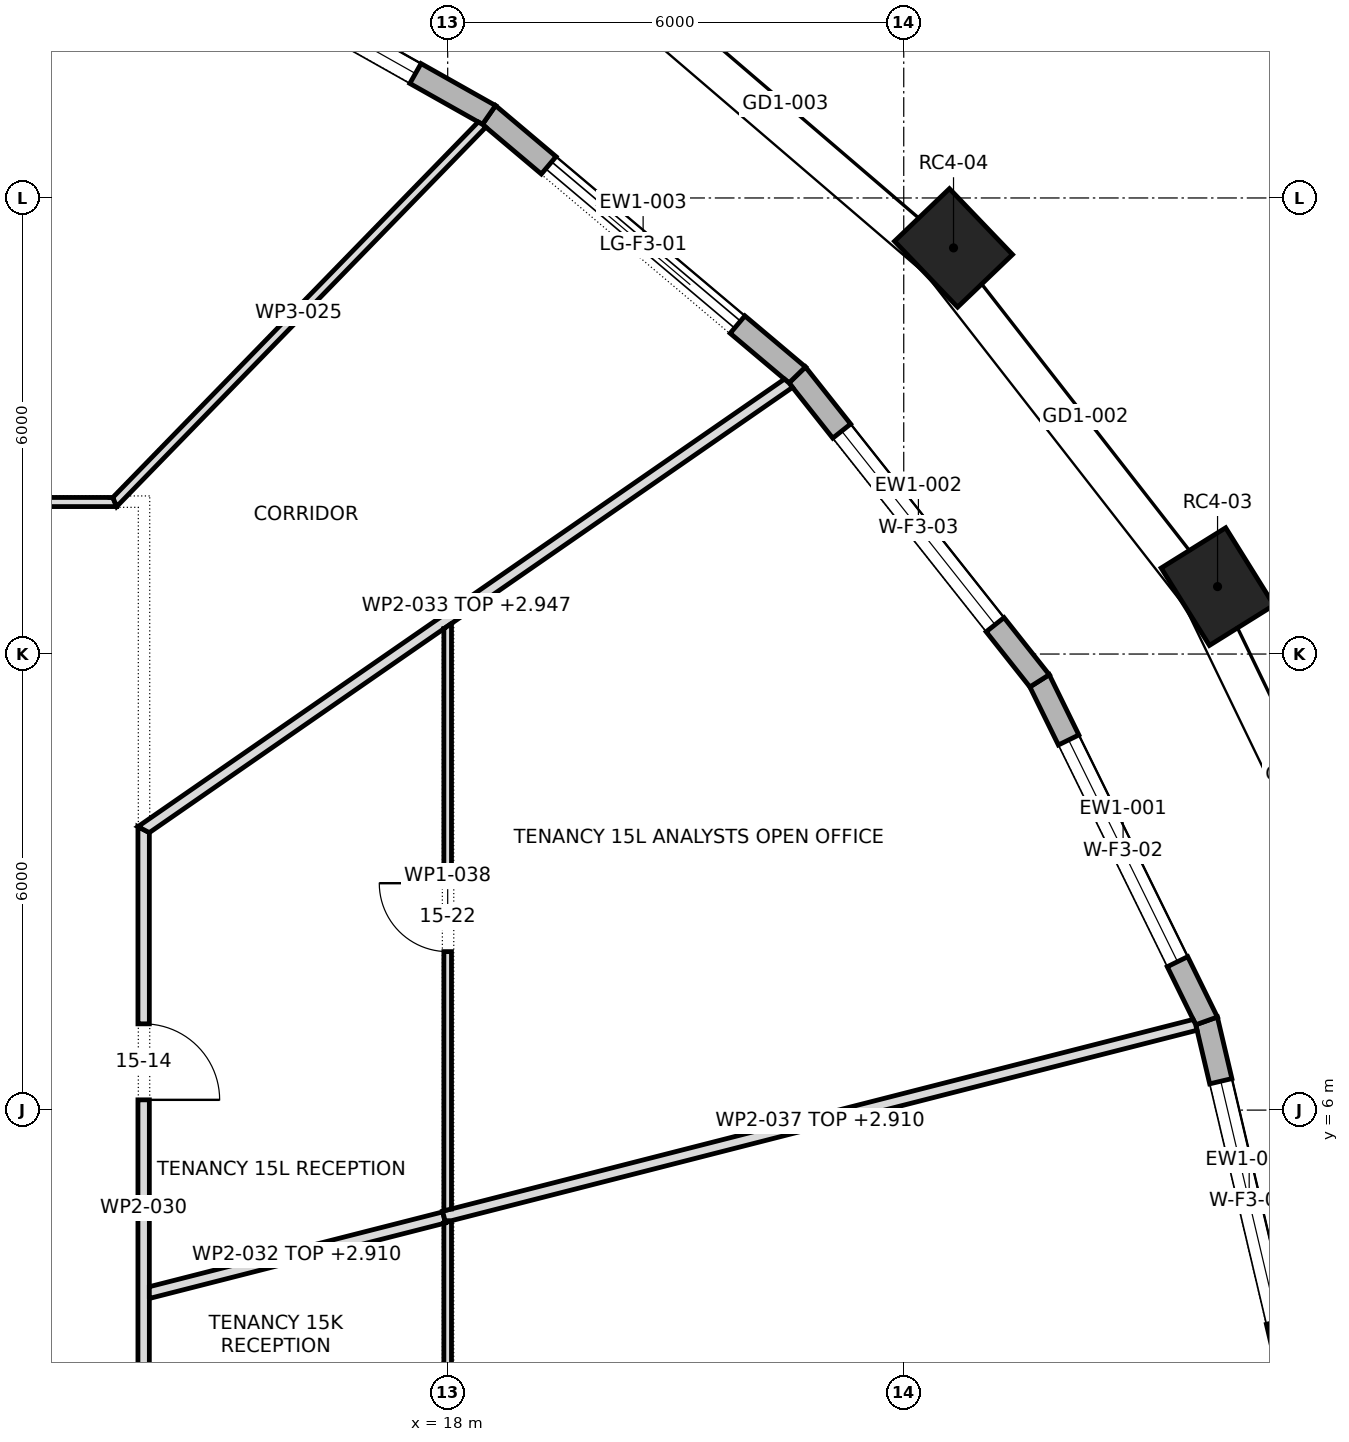
"""IFC4 building model, lengths in metres.
Left out: names, types, materials, properties, quantities, classifications, styles, units other than length and angle.
Written with IfcOpenShell. Run it as: python <this file> out.ifc"""

import sys

from ifc_helpers import new_model, si_unit, direction, frame, frame_2d, origin, origin_2d, place, context, subcontext, project, spatial, polyline, rectangle, outline, extrude, element, fill, save


model = new_model("IFC4")
c1 = context("Model", 3, precision=1e-05, world=origin(), true_north=direction((0.0, 1.0)))
c2 = subcontext(c1, "Body", "Model", "MODEL_VIEW")
j1 = project(units=[si_unit("LENGTHUNIT", "METRE"), si_unit("PLANEANGLEUNIT", "RADIAN")], contexts=[c1])
p1 = place(None, origin())
s1 = spatial("IfcSite", under=j1, at=p1, CompositionType="ELEMENT")
p2 = place(p1, origin())
s2 = spatial("IfcBuilding", under=s1, at=p2, CompositionType="ELEMENT")
p3 = place(p2, frame((0.0, 0.0, 214.9)))
s3 = spatial("IfcBuildingStorey", under=s2, at=p3, CompositionType="ELEMENT", Elevation=214.9)
for number, where, z_axis, x_axis in (
    (1, (28.129, 12.887, 0.0), (0.0, 0.0, 1.0), (-0.529, 0.849, 0.0)),
    (2, (24.655, 17.343, 0.0), (0.0, 0.0, 1.0), (-0.692, 0.722, 0.0)),
):
    element("IfcColumn", number, at=place(p3, frame(where, z_axis=z_axis, x_axis=x_axis)), inside=s3, PredefinedType="COLUMN", context=c2, shape_type="SweptSolid", body=[
        extrude(rectangle(XDim=1.2, YDim=1.0, at=origin_2d()), origin(), (0.0, 0.0, 1.0), 4.0),
    ])
p4 = place(p3, frame((29.104, 2.423, 0.0), z_axis=(0.0, 0.0, 1.0), x_axis=(-0.229546618766, 0.97329766763, 0.0)))
e3 = element("IfcWall", 3, at=p4, inside=s3, PredefinedType="STANDARD", context=c2, shape_type="SweptSolid", body=[
    extrude(outline(polyline([(-0.017, -0.15), (4.899, -0.15), (4.865, 0.15), (0.017, 0.15), (-0.017, -0.15)])), origin(), (0.0, 0.0, 1.0), 3.7),
])
p5 = place(p4, frame((0.816, 0.0, 0.6)))
e4 = element("IfcOpeningElement", 4, at=p5, cuts=e3, PredefinedType="OPENING", context=c2, shape_type="SweptSolid", body=[
    extrude(rectangle(XDim=3.25, YDim=2.65, at=frame_2d((1.625, 1.325))), frame((0.0, 0.162, 0.0), z_axis=(0.0, -1.0, 0.0), x_axis=(1.0, 0.0, 0.0)), (0.0, 0.0, 1.0), 0.324),
])
p6 = place(p3, frame((27.984, 7.174, 0.0), z_axis=(0.0, 0.0, 1.0), x_axis=(-0.440795186599, 0.897607711348, 0.0)))
e5 = element("IfcWall", 5, at=p6, inside=s3, PredefinedType="STANDARD", context=c2, shape_type="SweptSolid", body=[
    extrude(outline(polyline([(-0.017, -0.15), (5.0, -0.15), (4.968, 0.15), (0.017, 0.15), (-0.017, -0.15)])), origin(), (0.0, 0.0, 1.0), 3.7),
])
p7 = place(p6, frame((0.867, 0.0, 0.6)))
e6 = element("IfcOpeningElement", 6, at=p7, cuts=e5, PredefinedType="OPENING", context=c2, shape_type="SweptSolid", body=[
    extrude(rectangle(XDim=3.25, YDim=2.65, at=frame_2d((1.625, 1.325))), frame((0.0, 0.162, 0.0), z_axis=(0.0, -1.0, 0.0), x_axis=(1.0, 0.0, 0.0)), (0.0, 0.0, 1.0), 0.324),
])
p8 = place(p3, frame((25.787, 11.648, 0.0), z_axis=(0.0, 0.0, 1.0), x_axis=(-0.621017151557, 0.783796974651, 0.0)))
e7 = element("IfcWall", 7, at=p8, inside=s3, PredefinedType="STANDARD", context=c2, shape_type="SweptSolid", body=[
    extrude(outline(polyline([(-0.016, -0.15), (5.149, -0.15), (5.119, 0.15), (0.016, 0.15), (-0.016, -0.15)])), origin(), (0.0, 0.0, 1.0), 3.7),
])
p9 = place(p8, frame((0.942, 0.0, 0.6)))
e8 = element("IfcOpeningElement", 8, at=p9, cuts=e7, PredefinedType="OPENING", context=c2, shape_type="SweptSolid", body=[
    extrude(rectangle(XDim=3.25, YDim=2.65, at=frame_2d((1.625, 1.325))), frame((0.0, 0.162, 0.0), z_axis=(0.0, -1.0, 0.0), x_axis=(1.0, 0.0, 0.0)), (0.0, 0.0, 1.0), 0.324),
])
p10 = place(p3, frame((22.599, 15.672, 0.0), z_axis=(0.0, 0.0, 1.0), x_axis=(-0.764397795062, 0.644744919255, 0.0)))
e9 = element("IfcWall", 9, at=p10, inside=s3, PredefinedType="STANDARD", context=c2, shape_type="SweptSolid", body=[
    extrude(outline(polyline([(-0.015, -0.15), (5.319, -0.15), (5.291, 0.15), (0.015, 0.15), (-0.015, -0.15)])), origin(), (0.0, 0.0, 1.0), 3.7),
])
p11 = place(p10, frame((1.028, 0.0, 0.0)))
e10 = element("IfcOpeningElement", 10, at=p11, cuts=e9, PredefinedType="OPENING", context=c2, shape_type="SweptSolid", body=[
    extrude(rectangle(XDim=3.25, YDim=3.25, at=frame_2d((1.625, 1.625))), frame((0.0, 0.162, 0.0), z_axis=(0.0, -1.0, 0.0), x_axis=(1.0, 0.0, 0.0)), (0.0, 0.0, 1.0), 0.324),
])
p12 = place(p3, frame((18.543, 19.092, 0.0), z_axis=(0.0, 0.0, 1.0), x_axis=(-0.871207038577, 0.490915772749, 0.0)))
e11 = element("IfcWall", 11, at=p12, inside=s3, PredefinedType="STANDARD", context=c2, shape_type="SweptSolid", body=[
    extrude(outline(polyline([(-0.014, -0.15), (5.484, -0.15), (5.458, 0.15), (0.014, 0.15), (-0.014, -0.15)])), origin(), (0.0, 0.0, 1.0), 3.7),
])
p13 = place(p12, frame((1.111, 0.0, 0.6)))
e12 = element("IfcOpeningElement", 12, at=p13, cuts=e11, PredefinedType="OPENING", context=c2, shape_type="SweptSolid", body=[
    extrude(rectangle(XDim=3.25, YDim=2.65, at=frame_2d((1.625, 1.325))), frame((0.0, 0.162, 0.0), z_axis=(0.0, -1.0, 0.0), x_axis=(1.0, 0.0, 0.0)), (0.0, 0.0, 1.0), 0.324),
])
p14 = place(p3, frame((1.63, 14.0, 0.0), z_axis=(0.0, 0.0, 1.0), x_axis=(1.0, 0.0, 0.0)))
e13 = element("IfcWall", 13, at=p14, inside=s3, PredefinedType="PARTITIONING", context=c2, shape_type="SweptSolid", body=[
    extrude(outline(polyline([(12.015, -0.06), (12.015, -0.06), (11.965, 0.06), (9.971, 0.06), (7.977, 0.06), (5.982, 0.06), (3.988, 0.06), (1.994, 0.06), (0.0, 0.06), (0.0, -0.06), (1.717, -0.06), (3.433, -0.06), (5.149, -0.06), (6.866, -0.06), (8.583, -0.06), (10.299, -0.06), (12.015, -0.06)])), origin(), (0.0, 0.0, 1.0), 3.7),
])
p15 = place(p14, frame((5.495, 0.0, 0.0)))
e14 = element("IfcOpeningElement", 14, at=p15, cuts=e13, PredefinedType="OPENING", context=c2, shape_type="SweptSolid", body=[
    extrude(rectangle(XDim=1.0, YDim=2.1, at=frame_2d((0.5, 1.05))), frame((0.0, 0.072, 0.0), z_axis=(0.0, -1.0, 0.0), x_axis=(1.0, 0.0, 0.0)), (0.0, 0.0, 1.0), 0.144),
])
p16 = place(p3, frame((13.602, 13.982, 0.0), z_axis=(0.0, 0.0, 1.0), x_axis=(0.697346685185, 0.716733981797, 0.0)))
e15 = element("IfcWall", 15, at=p16, inside=s3, PredefinedType="PARTITIONING", context=c2, shape_type="SweptSolid", body=[
    extrude(outline(polyline([(6.964, -0.06), (6.964, -0.058), (6.96, -0.002), (6.943, 0.06), (5.22, 0.06), (3.497, 0.06), (1.774, 0.06), (0.051, 0.06), (0.051, 0.06), (0.025, 0.0), (0.0, -0.06), (1.741, -0.06), (3.482, -0.06), (5.223, -0.06), (6.964, -0.06)])), origin(), (0.0, 0.0, 1.0), 3.7),
])
p17 = place(p3, frame((14.0, -0.26, 0.0), z_axis=(0.0, 0.0, 1.0), x_axis=(0.0, 1.0, 0.0)))
e16 = element("IfcWall", 16, at=p17, inside=s3, PredefinedType="PARTITIONING", context=c2, shape_type="SweptSolid", body=[
    extrude(outline(polyline([(0.0, -0.075), (1.982, -0.075), (3.964, -0.075), (5.947, -0.075), (7.929, -0.075), (9.911, -0.075), (9.989, 0.075), (9.989, 0.075), (7.991, 0.075), (5.994, 0.075), (3.996, 0.075), (1.998, 0.075), (0.0, 0.075), (0.0, -0.075)])), origin(), (0.0, 0.0, 1.0), 3.7),
])
p18 = place(p17, frame((1.42, 0.0, 0.0)))
e17 = element("IfcOpeningElement", 17, at=p18, cuts=e16, PredefinedType="OPENING", context=c2, shape_type="SweptSolid", body=[
    extrude(rectangle(XDim=1.0, YDim=2.1, at=frame_2d((0.5, 1.05))), frame((0.0, 0.087, 0.0), z_axis=(0.0, -1.0, 0.0), x_axis=(1.0, 0.0, 0.0)), (0.0, 0.0, 1.0), 0.174),
])
p19 = place(p17, frame((6.395, 0.0, 0.0)))
e18 = element("IfcOpeningElement", 18, at=p19, cuts=e16, PredefinedType="OPENING", context=c2, shape_type="SweptSolid", body=[
    extrude(rectangle(XDim=1.0, YDim=2.1, at=frame_2d((0.5, 1.05))), frame((0.0, 0.087, 0.0), z_axis=(0.0, -1.0, 0.0), x_axis=(1.0, 0.0, 0.0)), (0.0, 0.0, 1.0), 0.174),
])
p20 = place(p3, frame((14.057, 3.594, 0.0), z_axis=(0.0, 0.0, 1.0), x_axis=(0.968992302027, 0.247090911634, 0.0)))
e19 = element("IfcWall", 19, at=p20, inside=s3, PredefinedType="PARTITIONING", context=c2, shape_type="SweptSolid", body=[
    extrude(outline(polyline([(0.0, -0.075), (2.0, -0.075), (3.999, -0.075), (3.999, -0.073), (4.005, -0.075), (4.021, -0.075), (4.021, 0.075), (2.029, 0.075), (0.038, 0.075), (0.0, -0.074), (0.0, -0.075)])), origin(), (0.0, 0.0, 1.0), 2.91),
])
p21 = place(p3, frame((13.968, 9.667, 0.0), z_axis=(0.0, 0.0, 1.0), x_axis=(0.822219313141, 0.56917080134, 0.0)))
e20 = element("IfcWall", 20, at=p21, inside=s3, PredefinedType="PARTITIONING", context=c2, shape_type="SweptSolid", body=[
    extrude(outline(polyline([(0.079, -0.075), (1.65, -0.075), (3.22, -0.075), (4.791, -0.075), (4.792, -0.073), (4.795, -0.075), (6.653, -0.075), (8.511, -0.075), (10.37, -0.075), (10.37, -0.066), (10.365, -0.0), (10.345, 0.075), (8.621, 0.075), (6.897, 0.075), (5.173, 0.075), (3.448, 0.075), (1.724, 0.075), (0.0, 0.075), (0.039, 0.0), (0.079, -0.075)])), origin(), (0.0, 0.0, 1.0), 2.947),
])
p22 = place(p3, frame((18.0, -4.535, 0.0), z_axis=(0.0, 0.0, 1.0), x_axis=(0.0, 1.0, 0.0)))
e21 = element("IfcWall", 21, at=p22, inside=s3, PredefinedType="PARTITIONING", context=c2, shape_type="SweptSolid", body=[
    extrude(outline(polyline([(9.08, -0.05), (9.08, -0.048), (9.06, 0.03), (9.08, 0.035), (9.08, 0.036), (9.05, 0.029), (9.045, 0.05), (7.471, 0.05), (5.898, 0.05), (4.325, 0.05), (4.325, 0.05), (4.225, 0.05), (4.225, 0.05), (2.825, 0.05), (1.425, 0.05), (0.025, 0.05), (0.0, -0.048), (0.0, -0.05), (1.816, -0.05), (3.632, -0.05), (5.448, -0.05), (7.264, -0.05), (9.08, -0.05)])), origin(), (0.0, 0.0, 1.0), 3.7),
])
p23 = place(p22, frame((6.255, 0.0, 0.0)))
e22 = element("IfcOpeningElement", 22, at=p23, cuts=e21, PredefinedType="OPENING", context=c2, shape_type="SweptSolid", body=[
    extrude(rectangle(XDim=0.9, YDim=2.1, at=frame_2d((0.45, 1.05))), frame((0.0, 0.062, 0.0), z_axis=(0.0, -1.0, 0.0), x_axis=(1.0, 0.0, 0.0)), (0.0, 0.0, 1.0), 0.124),
])
p24 = place(p3, frame((17.952, 4.598, 0.0), z_axis=(0.0, 0.0, 1.0), x_axis=(0.968895869382, 0.247468774381, 0.0)))
e23 = element("IfcWall", 23, at=p24, inside=s3, PredefinedType="PARTITIONING", context=c2, shape_type="SweptSolid", body=[
    extrude(outline(polyline([(10.206, -0.075), (10.206, 0.008), (10.192, 0.075), (8.513, 0.075), (6.835, 0.075), (5.156, 0.075), (3.478, 0.075), (1.799, 0.075), (0.121, 0.075), (0.121, 0.075), (0.12, 0.075), (0.0, 0.075), (0.0, -0.054), (0.081, -0.075), (1.768, -0.075), (3.456, -0.075), (5.143, -0.075), (6.831, -0.075), (8.518, -0.075), (10.206, -0.075)])), origin(), (0.0, 0.0, 1.0), 2.91),
])
p25 = place(p3, frame((18.0, 12.402, 0.0), z_axis=(0.0, 0.0, 1.0), x_axis=(0.0, -1.0, 0.0)))
e24 = element("IfcWall", 24, at=p25, inside=s3, PredefinedType="PARTITIONING", context=c2, shape_type="SweptSolid", body=[
    extrude(outline(polyline([(7.727, -0.05), (7.727, -0.048), (7.702, 0.05), (5.776, 0.05), (3.851, 0.05), (1.926, 0.05), (0.0, 0.05), (0.0, 0.05), (0.069, -0.05), (1.984, -0.05), (3.898, -0.05), (5.812, -0.05), (7.727, -0.05)])), origin(), (0.0, 0.0, 1.0), 3.7),
])
p26 = place(p25, frame((3.417, 0.0, 0.0)))
e25 = element("IfcOpeningElement", 25, at=p26, cuts=e24, PredefinedType="OPENING", context=c2, shape_type="SweptSolid", body=[
    extrude(rectangle(XDim=0.9, YDim=2.1, at=frame_2d((0.45, 1.05))), frame((0.0, 0.062, 0.0), z_axis=(0.0, -1.0, 0.0), x_axis=(1.0, 0.0, 0.0)), (0.0, 0.0, 1.0), 0.124),
])
p27 = place(p5, origin())
e26 = element("IfcWindow", 26, at=p27, inside=s3, PartitioningType="TRIPLE_PANEL_VERTICAL", PredefinedType="WINDOW", context=c2, shape_type="SweptSolid", body=[
    extrude(rectangle(XDim=3.25, YDim=2.65, at=frame_2d((1.625, 1.325))), frame((0.0, 0.03, 0.0), z_axis=(0.0, -1.0, 0.0), x_axis=(1.0, 0.0, 0.0)), (0.0, 0.0, 1.0), 0.06),
])
fill(e4, e26)
p28 = place(p7, origin())
e27 = element("IfcWindow", 27, at=p28, inside=s3, PartitioningType="TRIPLE_PANEL_VERTICAL", PredefinedType="WINDOW", context=c2, shape_type="SweptSolid", body=[
    extrude(rectangle(XDim=3.25, YDim=2.65, at=frame_2d((1.625, 1.325))), frame((0.0, 0.03, 0.0), z_axis=(0.0, -1.0, 0.0), x_axis=(1.0, 0.0, 0.0)), (0.0, 0.0, 1.0), 0.06),
])
fill(e6, e27)
p29 = place(p9, origin())
e28 = element("IfcWindow", 28, at=p29, inside=s3, PartitioningType="TRIPLE_PANEL_VERTICAL", PredefinedType="WINDOW", context=c2, shape_type="SweptSolid", body=[
    extrude(rectangle(XDim=3.25, YDim=2.65, at=frame_2d((1.625, 1.325))), frame((0.0, 0.03, 0.0), z_axis=(0.0, -1.0, 0.0), x_axis=(1.0, 0.0, 0.0)), (0.0, 0.0, 1.0), 0.06),
])
fill(e8, e28)
p30 = place(p11, origin())
e29 = element("IfcDoor", 29, at=p30, inside=s3, OperationType="DOUBLE_DOOR_SLIDING", PredefinedType="DOOR", context=c2, shape_type="SweptSolid", body=[
    extrude(rectangle(XDim=3.25, YDim=3.25, at=frame_2d((1.625, 1.625))), frame((0.0, 0.025, 0.0), z_axis=(0.0, -1.0, 0.0), x_axis=(1.0, 0.0, 0.0)), (0.0, 0.0, 1.0), 0.05),
])
fill(e10, e29)
p31 = place(p13, origin())
e30 = element("IfcWindow", 30, at=p31, inside=s3, PartitioningType="TRIPLE_PANEL_VERTICAL", PredefinedType="WINDOW", context=c2, shape_type="SweptSolid", body=[
    extrude(rectangle(XDim=3.25, YDim=2.65, at=frame_2d((1.625, 1.325))), frame((0.0, 0.03, 0.0), z_axis=(0.0, -1.0, 0.0), x_axis=(1.0, 0.0, 0.0)), (0.0, 0.0, 1.0), 0.06),
])
fill(e12, e30)
p32 = place(p19, frame((1.0, 0.0, 0.0), z_axis=(0.0, 0.0, 1.0), x_axis=(-1.0, 0.0, 0.0)))
e31 = element("IfcDoor", 31, at=p32, inside=s3, OperationType="SINGLE_SWING_LEFT", PredefinedType="DOOR", context=c2, shape_type="SweptSolid", body=[
    extrude(rectangle(XDim=1.0, YDim=2.1, at=frame_2d((0.5, 1.05))), frame((0.0, 0.025, 0.0), z_axis=(0.0, -1.0, 0.0), x_axis=(1.0, 0.0, 0.0)), (0.0, 0.0, 1.0), 0.05),
])
fill(e18, e31)
p33 = place(p26, frame((0.9, 0.0, 0.0), z_axis=(0.0, 0.0, 1.0), x_axis=(-1.0, 0.0, 0.0)))
e32 = element("IfcDoor", 32, at=p33, inside=s3, OperationType="SINGLE_SWING_LEFT", PredefinedType="DOOR", context=c2, shape_type="SweptSolid", body=[
    extrude(rectangle(XDim=0.9, YDim=2.1, at=frame_2d((0.45, 1.05))), frame((0.0, 0.025, 0.0), z_axis=(0.0, -1.0, 0.0), x_axis=(1.0, 0.0, 0.0)), (0.0, 0.0, 1.0), 0.05),
])
fill(e25, e32)
save(model, sys.argv[1])
